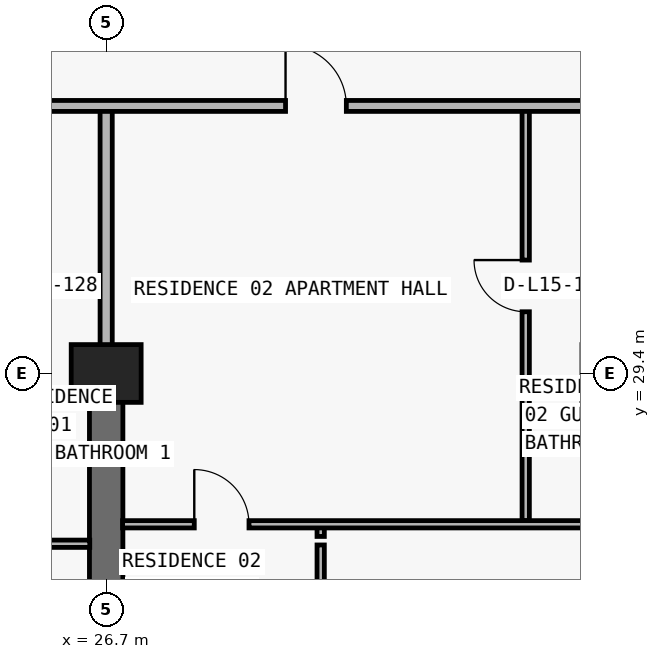
"""IFC4 building model, lengths in metres.
Left out: names, types, materials, properties, quantities, classifications, styles, units other than length and angle.
Written with IfcOpenShell. Run it as: python <this file> out.ifc"""

import sys

from ifc_helpers import new_model, si_unit, direction, frame, frame_2d, origin, origin_2d, place, context, subcontext, project, spatial, rectangle, extrude, element, fill, save


model = new_model("IFC4")
c1 = context("Model", 3, precision=1e-05, world=origin(), true_north=direction((0.0, 1.0)))
c2 = subcontext(c1, "Body", "Model", "MODEL_VIEW")
j1 = project(units=[si_unit("LENGTHUNIT", "METRE"), si_unit("PLANEANGLEUNIT", "RADIAN")], contexts=[c1])
p1 = place(None, origin())
s1 = spatial("IfcSite", under=j1, at=p1, CompositionType="ELEMENT")
p2 = place(p1, origin())
s2 = spatial("IfcBuilding", under=s1, at=p2, CompositionType="ELEMENT")
p3 = place(p2, frame((0.0, 0.0, 59.7)))
s3 = spatial("IfcBuildingStorey", under=s2, at=p3, CompositionType="ELEMENT", Elevation=59.7)
p4 = place(p3, frame((26.7, 29.4, 0.0), z_axis=(0.0, 0.0, 1.0), x_axis=(1.0, 0.0, 0.0)))
e1 = element("IfcColumn", 1, at=p4, inside=s3, PredefinedType="COLUMN", context=c2, shape_type="SweptSolid", body=[
    extrude(rectangle(XDim=1.15, YDim=0.95, at=origin_2d()), origin(), (0.0, 0.0, 1.0), 3.05),
])
p5 = place(p3, frame((26.7, 20.8, 0.0), z_axis=(0.0, 0.0, 1.0), x_axis=(0.0, 1.0, 0.0)))
e2 = element("IfcWall", 2, at=p5, inside=s3, PredefinedType="SHEAR", context=c2, shape_type="SweptSolid", body=[
    extrude(rectangle(XDim=8.6, YDim=0.55, at=frame_2d((4.3, 0.0))), origin(), (0.0, 0.0, 1.0), 3.05),
])
p6 = place(p3, frame((26.7, 29.405, 0.0), z_axis=(0.0, 0.0, 1.0), x_axis=(0.0, 1.0, 0.0)))
e3 = element("IfcWall", 3, at=p6, inside=s3, PredefinedType="PARTITIONING", context=c2, shape_type="SweptSolid", body=[
    extrude(rectangle(XDim=4.395, YDim=0.2, at=frame_2d((2.198, 0.0))), origin(), (0.0, 0.0, 1.0), 2.335),
])
p7 = place(p3, frame((30.228, 22.2, 0.0), z_axis=(0.0, 0.0, 1.0), x_axis=(0.0, 1.0, 0.0)))
e4 = element("IfcWall", 4, at=p7, inside=s3, PredefinedType="PARTITIONING", context=c2, shape_type="SweptSolid", body=[
    extrude(rectangle(XDim=4.38, YDim=0.12, at=frame_2d((2.19, 0.0))), origin(), (0.0, 0.0, 1.0), 3.05),
])
p8 = place(p7, frame((1.74, 0.0, 0.0)))
e5 = element("IfcOpeningElement", 5, at=p8, cuts=e4, PredefinedType="OPENING", context=c2, shape_type="SweptSolid", body=[
    extrude(rectangle(XDim=0.9, YDim=2.15, at=frame_2d((0.45, 1.075))), frame((0.0, 0.07, 0.0), z_axis=(0.0, -1.0, 0.0), x_axis=(1.0, 0.0, 0.0)), (0.0, 0.0, 1.0), 0.14),
])
p9 = place(p3, frame((30.228, 26.72, 0.0), z_axis=(0.0, 0.0, 1.0), x_axis=(0.0, 1.0, 0.0)))
e6 = element("IfcWall", 6, at=p9, inside=s3, PredefinedType="PARTITIONING", context=c2, shape_type="SweptSolid", body=[
    extrude(rectangle(XDim=0.2, YDim=0.12, at=frame_2d((0.1, 0.0))), origin(), (0.0, 0.0, 1.0), 3.05),
])
p10 = place(p3, frame((33.6, 26.98, 0.0), z_axis=(0.0, 0.0, 1.0), x_axis=(0.0, 1.0, 0.0)))
e7 = element("IfcWall", 7, at=p10, inside=s3, PredefinedType="PARTITIONING", context=c2, shape_type="SweptSolid", body=[
    extrude(rectangle(XDim=6.82, YDim=0.12, at=frame_2d((3.41, 0.0))), origin(), (0.0, 0.0, 1.0), 3.05),
])
p11 = place(p10, frame((3.435, 0.0, 0.0)))
e8 = element("IfcOpeningElement", 8, at=p11, cuts=e7, PredefinedType="OPENING", context=c2, shape_type="SweptSolid", body=[
    extrude(rectangle(XDim=0.85, YDim=2.1, at=frame_2d((0.425, 1.05))), frame((0.0, 0.07, 0.0), z_axis=(0.0, -1.0, 0.0), x_axis=(1.0, 0.0, 0.0)), (0.0, 0.0, 1.0), 0.14),
])
p12 = place(p3, frame((18.3, 26.6, 0.0), z_axis=(0.0, 0.0, 1.0), x_axis=(1.0, 0.0, 0.0)))
e9 = element("IfcWall", 9, at=p12, inside=s3, PredefinedType="PARTITIONING", context=c2, shape_type="SweptSolid", body=[
    extrude(rectangle(XDim=8.13, YDim=0.12, at=frame_2d((4.065, 0.0))), origin(), (0.0, 0.0, 1.0), 3.05),
])
p13 = place(p12, frame((3.0, 0.0, 0.0)))
e10 = element("IfcOpeningElement", 10, at=p13, cuts=e9, PredefinedType="OPENING", context=c2, shape_type="SweptSolid", body=[
    extrude(rectangle(XDim=0.9, YDim=2.15, at=frame_2d((0.45, 1.075))), frame((0.0, 0.07, 0.0), z_axis=(0.0, -1.0, 0.0), x_axis=(1.0, 0.0, 0.0)), (0.0, 0.0, 1.0), 0.14),
])
p14 = place(p3, frame((26.97, 26.92, 0.0), z_axis=(0.0, 0.0, 1.0), x_axis=(1.0, 0.0, 0.0)))
e11 = element("IfcWall", 11, at=p14, inside=s3, PredefinedType="PARTITIONING", context=c2, shape_type="SweptSolid", body=[
    extrude(rectangle(XDim=8.13, YDim=0.12, at=frame_2d((4.065, 0.0))), origin(), (0.0, 0.0, 1.0), 3.05),
])
p15 = place(p14, frame((1.179, 0.0, 0.0)))
e12 = element("IfcOpeningElement", 12, at=p15, cuts=e11, PredefinedType="OPENING", context=c2, shape_type="SweptSolid", body=[
    extrude(rectangle(XDim=0.9, YDim=2.15, at=frame_2d((0.45, 1.075))), frame((0.0, 0.07, 0.0), z_axis=(0.0, -1.0, 0.0), x_axis=(1.0, 0.0, 0.0)), (0.0, 0.0, 1.0), 0.14),
])
p16 = place(p3, frame((5.105, 33.8, 0.0), z_axis=(0.0, 0.0, 1.0), x_axis=(1.0, 0.0, 0.0)))
e13 = element("IfcWall", 13, at=p16, inside=s3, PredefinedType="PARTITIONING", context=c2, shape_type="SweptSolid", body=[
    extrude(rectangle(XDim=67.595, YDim=0.18, at=frame_2d((33.797, 0.0))), origin(), (0.0, 0.0, 1.0), 3.05),
])
p17 = place(p16, frame((7.745, 0.0, 0.0)))
e14 = element("IfcOpeningElement", 14, at=p17, cuts=e13, PredefinedType="OPENING", context=c2, shape_type="SweptSolid", body=[
    extrude(rectangle(XDim=1.0, YDim=2.2, at=frame_2d((0.5, 1.1))), frame((0.0, 0.1, 0.0), z_axis=(0.0, -1.0, 0.0), x_axis=(1.0, 0.0, 0.0)), (0.0, 0.0, 1.0), 0.2),
])
p18 = place(p16, frame((24.545, 0.0, 0.0)))
e15 = element("IfcOpeningElement", 15, at=p18, cuts=e13, PredefinedType="OPENING", context=c2, shape_type="SweptSolid", body=[
    extrude(rectangle(XDim=1.0, YDim=2.2, at=frame_2d((0.5, 1.1))), frame((0.0, 0.1, 0.0), z_axis=(0.0, -1.0, 0.0), x_axis=(1.0, 0.0, 0.0)), (0.0, 0.0, 1.0), 0.2),
])
p19 = place(p16, frame((40.47, 0.0, 0.0)))
e16 = element("IfcOpeningElement", 16, at=p19, cuts=e13, PredefinedType="OPENING", context=c2, shape_type="SweptSolid", body=[
    extrude(rectangle(XDim=1.0, YDim=2.2, at=frame_2d((0.5, 1.1))), frame((0.0, 0.1, 0.0), z_axis=(0.0, -1.0, 0.0), x_axis=(1.0, 0.0, 0.0)), (0.0, 0.0, 1.0), 0.2),
])
p20 = place(p16, frame((48.87, 0.0, 0.0)))
e17 = element("IfcOpeningElement", 17, at=p20, cuts=e13, PredefinedType="OPENING", context=c2, shape_type="SweptSolid", body=[
    extrude(rectangle(XDim=1.0, YDim=2.2, at=frame_2d((0.5, 1.1))), frame((0.0, 0.1, 0.0), z_axis=(0.0, -1.0, 0.0), x_axis=(1.0, 0.0, 0.0)), (0.0, 0.0, 1.0), 0.2),
])
p21 = place(p16, frame((57.27, 0.0, 0.0)))
e18 = element("IfcOpeningElement", 18, at=p21, cuts=e13, PredefinedType="OPENING", context=c2, shape_type="SweptSolid", body=[
    extrude(rectangle(XDim=1.0, YDim=2.2, at=frame_2d((0.5, 1.1))), frame((0.0, 0.1, 0.0), z_axis=(0.0, -1.0, 0.0), x_axis=(1.0, 0.0, 0.0)), (0.0, 0.0, 1.0), 0.2),
])
p22 = place(p18, origin())
e19 = element("IfcDoor", 19, at=p22, inside=s3, OperationType="SINGLE_SWING_LEFT", PredefinedType="DOOR", context=c2, shape_type="SweptSolid", body=[
    extrude(rectangle(XDim=1.0, YDim=2.2, at=frame_2d((0.5, 1.1))), frame((0.0, 0.025, 0.0), z_axis=(0.0, -1.0, 0.0), x_axis=(1.0, 0.0, 0.0)), (0.0, 0.0, 1.0), 0.05),
])
fill(e15, e19)
p23 = place(p11, origin())
e20 = element("IfcDoor", 20, at=p23, inside=s3, OperationType="SINGLE_SWING_RIGHT", PredefinedType="DOOR", context=c2, shape_type="SweptSolid", body=[
    extrude(rectangle(XDim=0.85, YDim=2.1, at=frame_2d((0.425, 1.05))), frame((0.0, 0.025, 0.0), z_axis=(0.0, -1.0, 0.0), x_axis=(1.0, 0.0, 0.0)), (0.0, 0.0, 1.0), 0.05),
])
fill(e8, e20)
p24 = place(p15, origin())
e21 = element("IfcDoor", 21, at=p24, inside=s3, OperationType="SINGLE_SWING_LEFT", PredefinedType="DOOR", context=c2, shape_type="SweptSolid", body=[
    extrude(rectangle(XDim=0.9, YDim=2.15, at=frame_2d((0.45, 1.075))), frame((0.0, 0.025, 0.0), z_axis=(0.0, -1.0, 0.0), x_axis=(1.0, 0.0, 0.0)), (0.0, 0.0, 1.0), 0.05),
])
fill(e12, e21)
save(model, sys.argv[1])
